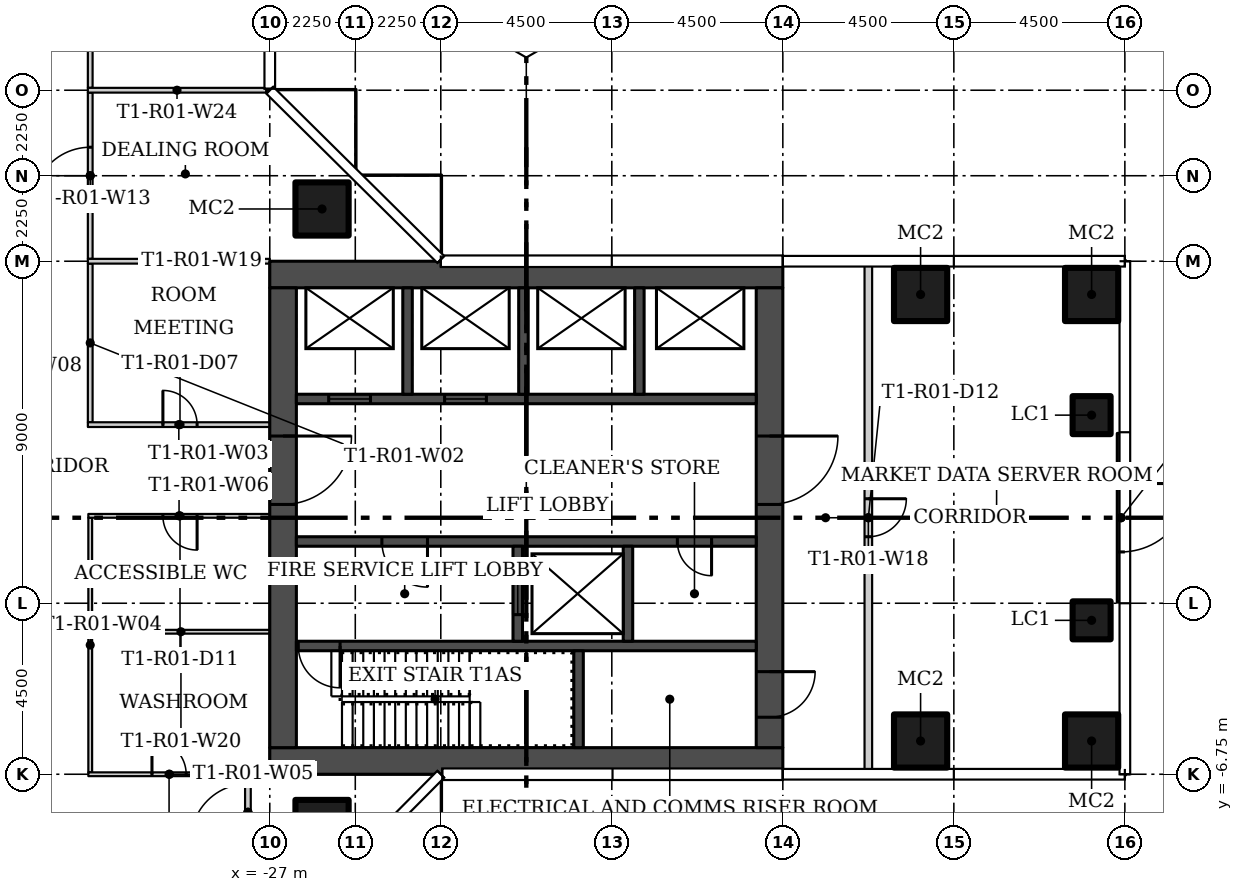
"""IFC4 building model, lengths in metres.
Left out: names, types, materials, properties, quantities, classifications, styles, units other than length and angle.
Written with IfcOpenShell. Run it as: python <this file> out.ifc"""

import sys

from ifc_helpers import new_model, si_unit, direction, frame, frame_2d, origin, origin_2d, place, context, subcontext, project, spatial, rectangle, hollow_rectangle, extrude, element, fill, save


model = new_model("IFC4")
c1 = context("Model", 3, precision=1e-05, world=origin(), true_north=direction((0.0, 1.0)))
c2 = subcontext(c1, "Body", "Model", "MODEL_VIEW")
j1 = project(units=[si_unit("LENGTHUNIT", "METRE"), si_unit("PLANEANGLEUNIT", "RADIAN")], contexts=[c1])
p1 = place(None, origin())
s1 = spatial("IfcSite", under=j1, at=p1, CompositionType="ELEMENT")
p2 = place(p1, origin())
s2 = spatial("IfcBuilding", under=s1, at=p2, CompositionType="ELEMENT")
p3 = place(p2, frame((0.0, 0.0, 28.5)))
s3 = spatial("IfcBuildingStorey", under=s2, at=p3, CompositionType="ELEMENT", Elevation=28.5)
for number, where in (
    (1, (-25.625, 8.125, 0.0)),
    (2, (-25.625, -8.125, 0.0)),
    (3, (-9.875, -5.875, 0.0)),
    (4, (-5.375, -5.875, 0.0)),
    (5, (-9.875, 5.875, 0.0)),
    (6, (-5.375, 5.875, 0.0)),
):
    element("IfcColumn", number, at=place(p3, frame(where)), inside=s3, PredefinedType="COLUMN", context=c2, shape_type="SweptSolid", body=[
        extrude(hollow_rectangle(XDim=1.4, YDim=1.4, WallThickness=0.05, at=origin_2d()), origin(), (0.0, 0.0, 1.0), 4.15),
    ])
for number, where in (
    (7, (-5.375, -2.7, 0.0)),
    (8, (-5.375, 2.7, 0.0)),
):
    element("IfcColumn", number, at=place(p3, frame(where)), inside=s3, PredefinedType="COLUMN", context=c2, shape_type="SweptSolid", body=[
        extrude(hollow_rectangle(XDim=1.0, YDim=1.0, WallThickness=0.04, at=origin_2d()), origin(), (0.0, 0.0, 1.0), 4.15),
    ])
p4 = place(p3, frame((-31.725, 20.175, 0.0), z_axis=(0.0, 0.0, 1.0), x_axis=(0.0, -1.0, 0.0)))
e9 = element("IfcWall", 9, at=p4, inside=s3, PredefinedType="PARTITIONING", context=c2, shape_type="SweptSolid", body=[
    extrude(rectangle(XDim=8.863, YDim=0.125, at=frame_2d((4.431, 0.0))), origin(), (0.0, 0.0, 1.0), 4.15),
])
p5 = place(p4, frame((3.675, 0.0, 0.0)))
e10 = element("IfcOpeningElement", 10, at=p5, cuts=e9, PredefinedType="OPENING", context=c2, shape_type="SweptSolid", body=[
    extrude(rectangle(XDim=1.5, YDim=2.1, at=frame_2d((0.75, 1.05))), frame((0.0, 0.073, 0.0), z_axis=(0.0, -1.0, 0.0), x_axis=(1.0, 0.0, 0.0)), (0.0, 0.0, 1.0), 0.145),
])
p6 = place(p3, frame((-31.725, 6.688, 0.0), z_axis=(0.0, 0.0, 1.0), x_axis=(0.0, -1.0, 0.0)))
e11 = element("IfcWall", 11, at=p6, inside=s3, PredefinedType="PARTITIONING", context=c2, shape_type="SweptSolid", body=[
    extrude(rectangle(XDim=4.175, YDim=0.125, at=frame_2d((2.087, 0.0))), origin(), (0.0, 0.0, 1.0), 4.15),
])
p7 = place(p3, frame((-31.787, 2.45, 0.0)))
e12 = element("IfcWall", 12, at=p7, inside=s3, PredefinedType="PARTITIONING", context=c2, shape_type="SweptSolid", body=[
    extrude(rectangle(XDim=4.787, YDim=0.125, at=frame_2d((2.394, 0.0))), origin(), (0.0, 0.0, 1.0), 4.15),
])
p8 = place(p7, frame((1.975, 0.0, 0.0)))
e13 = element("IfcOpeningElement", 13, at=p8, cuts=e12, PredefinedType="OPENING", context=c2, shape_type="SweptSolid", body=[
    extrude(rectangle(XDim=0.9, YDim=2.1, at=frame_2d((0.45, 1.05))), frame((0.0, 0.073, 0.0), z_axis=(0.0, -1.0, 0.0), x_axis=(1.0, 0.0, 0.0)), (0.0, 0.0, 1.0), 0.145),
])
p9 = place(p3, frame((-31.725, -0.0, 0.0), z_axis=(0.0, 0.0, 1.0), x_axis=(0.0, -1.0, 0.0)))
e14 = element("IfcWall", 14, at=p9, inside=s3, PredefinedType="PARTITIONING", context=c2, shape_type="SweptSolid", body=[
    extrude(rectangle(XDim=6.7, YDim=0.1, at=frame_2d((3.35, 0.0))), origin(), (0.0, 0.0, 1.0), 4.15),
])
p10 = place(p3, frame((-31.775, -6.75, 0.0)))
e15 = element("IfcWall", 15, at=p10, inside=s3, PredefinedType="PARTITIONING", context=c2, shape_type="SweptSolid", body=[
    extrude(rectangle(XDim=4.274, YDim=0.1, at=frame_2d((2.137, 0.0))), origin(), (0.0, 0.0, 1.0), 4.15),
])
p11 = place(p10, frame((1.675, 0.0, 0.0)))
e16 = element("IfcOpeningElement", 16, at=p11, cuts=e15, PredefinedType="OPENING", context=c2, shape_type="SweptSolid", body=[
    extrude(rectangle(XDim=0.9, YDim=2.1, at=frame_2d((0.45, 1.05))), frame((0.0, 0.06, 0.0), z_axis=(0.0, -1.0, 0.0), x_axis=(1.0, 0.0, 0.0)), (0.0, 0.0, 1.0), 0.12),
])
p12 = place(p3, frame((-27.0, 0.05, 0.0), z_axis=(0.0, 0.0, 1.0), x_axis=(-1.0, 0.0, 0.0)))
e17 = element("IfcWall", 17, at=p12, inside=s3, PredefinedType="PARTITIONING", context=c2, shape_type="SweptSolid", body=[
    extrude(rectangle(XDim=4.775, YDim=0.1, at=frame_2d((2.387, 0.0))), origin(), (0.0, 0.0, 1.0), 4.15),
])
p13 = place(p12, frame((1.912, 0.0, 0.0)))
e18 = element("IfcOpeningElement", 18, at=p13, cuts=e17, PredefinedType="OPENING", context=c2, shape_type="SweptSolid", body=[
    extrude(rectangle(XDim=0.9, YDim=2.1, at=frame_2d((0.45, 1.05))), frame((0.0, 0.06, 0.0), z_axis=(0.0, -1.0, 0.0), x_axis=(1.0, 0.0, 0.0)), (0.0, 0.0, 1.0), 0.12),
])
p14 = place(p3, frame((-31.725, 6.812, 0.0), z_axis=(0.0, 0.0, 1.0), x_axis=(0.0, 1.0, 0.0)))
e19 = element("IfcWall", 19, at=p14, inside=s3, PredefinedType="PARTITIONING", context=c2, shape_type="SweptSolid", body=[
    extrude(rectangle(XDim=4.375, YDim=0.125, at=frame_2d((2.188, 0.0))), origin(), (0.0, 0.0, 1.0), 4.15),
])
p15 = place(p14, frame((1.438, 0.0, 0.0)))
e20 = element("IfcOpeningElement", 20, at=p15, cuts=e19, PredefinedType="OPENING", context=c2, shape_type="SweptSolid", body=[
    extrude(rectangle(XDim=1.5, YDim=2.1, at=frame_2d((0.75, 1.05))), frame((0.0, 0.073, 0.0), z_axis=(0.0, -1.0, 0.0), x_axis=(1.0, 0.0, 0.0)), (0.0, 0.0, 1.0), 0.145),
])
p16 = place(p3, frame((-27.575, -8.675, 0.0), z_axis=(0.0, 0.0, 1.0), x_axis=(0.0, 1.0, 0.0)))
e21 = element("IfcWall", 21, at=p16, inside=s3, PredefinedType="PARTITIONING", context=c2, shape_type="SweptSolid", body=[
    extrude(rectangle(XDim=1.85, YDim=0.15, at=frame_2d((0.925, 0.0))), origin(), (0.0, 0.0, 1.0), 4.15),
])
p17 = place(p16, frame((0.175, 0.0, 0.0)))
e22 = element("IfcOpeningElement", 22, at=p17, cuts=e21, PredefinedType="OPENING", context=c2, shape_type="SweptSolid", body=[
    extrude(rectangle(XDim=1.5, YDim=2.4, at=frame_2d((0.75, 1.2))), frame((0.0, 0.085, 0.0), z_axis=(0.0, -1.0, 0.0), x_axis=(1.0, 0.0, 0.0)), (0.0, 0.0, 1.0), 0.17),
])
p18 = place(p3, frame((-11.25, 6.655, 0.0), z_axis=(0.0, 0.0, 1.0), x_axis=(0.0, -1.0, 0.0)))
e23 = element("IfcWall", 23, at=p18, inside=s3, PredefinedType="PARTITIONING", context=c2, shape_type="SweptSolid", body=[
    extrude(rectangle(XDim=13.31, YDim=0.2, at=frame_2d((6.655, 0.0))), origin(), (0.0, 0.0, 1.0), 4.15),
])
p19 = place(p18, frame((6.155, 0.0, 0.0)))
e24 = element("IfcOpeningElement", 24, at=p19, cuts=e23, PredefinedType="OPENING", context=c2, shape_type="SweptSolid", body=[
    extrude(rectangle(XDim=1.0, YDim=2.1, at=frame_2d((0.5, 1.05))), frame((0.0, 0.11, 0.0), z_axis=(0.0, -1.0, 0.0), x_axis=(1.0, 0.0, 0.0)), (0.0, 0.0, 1.0), 0.22),
])
p20 = place(p3, frame((-27.0, 6.75, 0.0), z_axis=(0.0, 0.0, 1.0), x_axis=(-1.0, 0.0, 0.0)))
e25 = element("IfcWall", 25, at=p20, inside=s3, PredefinedType="PARTITIONING", context=c2, shape_type="SweptSolid", body=[
    extrude(rectangle(XDim=4.787, YDim=0.125, at=frame_2d((2.394, 0.0))), origin(), (0.0, 0.0, 1.0), 4.15),
])
p21 = place(p3, frame((-27.0, -3.0, 0.0), z_axis=(0.0, 0.0, 1.0), x_axis=(-1.0, 0.0, 0.0)))
e26 = element("IfcWall", 26, at=p21, inside=s3, PredefinedType="PARTITIONING", context=c2, shape_type="SweptSolid", body=[
    extrude(rectangle(XDim=4.675, YDim=0.1, at=frame_2d((2.337, 0.0))), origin(), (0.0, 0.0, 1.0), 4.15),
])
p22 = place(p3, frame((-27.65, -6.75, 0.0)))
e27 = element("IfcWall", 27, at=p22, inside=s3, PredefinedType="PARTITIONING", context=c2, shape_type="SweptSolid", body=[
    extrude(rectangle(XDim=0.65, YDim=0.15, at=frame_2d((0.325, 0.0))), origin(), (0.0, 0.0, 1.0), 4.15),
])
p23 = place(p3, frame((-27.095, 11.25, 0.0), z_axis=(0.0, 0.0, 1.0), x_axis=(-1.0, 0.0, 0.0)))
e28 = element("IfcWall", 28, at=p23, inside=s3, PredefinedType="PARTITIONING", context=c2, shape_type="SweptSolid", body=[
    extrude(rectangle(XDim=4.692, YDim=0.125, at=frame_2d((2.346, 0.0))), origin(), (0.0, 0.0, 1.0), 4.15),
])
p24 = place(p3, frame((-4.6, 2.22, 0.0), z_axis=(0.0, 0.0, 1.0), x_axis=(0.0, -1.0, 0.0)))
e29 = element("IfcWall", 29, at=p24, inside=s3, PredefinedType="SOLIDWALL", context=c2, shape_type="SweptSolid", body=[
    extrude(rectangle(XDim=4.44, YDim=0.2, at=frame_2d((2.22, 0.0))), origin(), (0.0, 0.0, 1.0), 3.0),
])
p25 = place(p24, frame((1.32, 0.0, 0.0)))
e30 = element("IfcOpeningElement", 30, at=p25, cuts=e29, PredefinedType="OPENING", context=c2, shape_type="SweptSolid", body=[
    extrude(rectangle(XDim=1.8, YDim=2.4, at=frame_2d((0.9, 1.2))), frame((0.0, 0.11, 0.0), z_axis=(0.0, -1.0, 0.0), x_axis=(1.0, 0.0, 0.0)), (0.0, 0.0, 1.0), 0.22),
])
for number, where in (
    (31, (-27.0, -6.4, 0.0)),
    (32, (-27.0, 6.4, 0.0)),
):
    element("IfcWall", number, at=place(p3, frame(where)), inside=s3, PredefinedType="SHEAR", context=c2, shape_type="SweptSolid", body=[
        extrude(rectangle(XDim=13.5, YDim=0.7, at=frame_2d((6.75, 0.0))), origin(), (0.0, 0.0, 1.0), 4.15),
    ])
p26 = place(p3, frame((-26.65, 6.05, 0.0), z_axis=(0.0, 0.0, 1.0), x_axis=(0.0, -1.0, 0.0)))
e33 = element("IfcWall", 33, at=p26, inside=s3, PredefinedType="SHEAR", context=c2, shape_type="SweptSolid", body=[
    extrude(rectangle(XDim=12.1, YDim=0.7, at=frame_2d((6.05, 0.0))), origin(), (0.0, 0.0, 1.0), 4.15),
])
p27 = place(p26, frame((3.9, 0.0, 0.0)))
e34 = element("IfcOpeningElement", 34, at=p27, cuts=e33, PredefinedType="OPENING", context=c2, shape_type="SweptSolid", body=[
    extrude(rectangle(XDim=1.8, YDim=2.4, at=frame_2d((0.9, 1.2))), frame((0.0, 0.36, 0.0), z_axis=(0.0, -1.0, 0.0), x_axis=(1.0, 0.0, 0.0)), (0.0, 0.0, 1.0), 0.72),
])
p28 = place(p3, frame((-13.85, 6.05, 0.0), z_axis=(0.0, 0.0, 1.0), x_axis=(0.0, -1.0, 0.0)))
e35 = element("IfcWall", 35, at=p28, inside=s3, PredefinedType="SHEAR", context=c2, shape_type="SweptSolid", body=[
    extrude(rectangle(XDim=12.1, YDim=0.7, at=frame_2d((6.05, 0.0))), origin(), (0.0, 0.0, 1.0), 4.15),
])
p29 = place(p28, frame((10.1, 0.0, 0.0)))
e36 = element("IfcOpeningElement", 36, at=p29, cuts=e35, PredefinedType="OPENING", context=c2, shape_type="SweptSolid", body=[
    extrude(rectangle(XDim=1.2, YDim=2.1, at=frame_2d((0.6, 1.05))), frame((0.0, 0.36, 0.0), z_axis=(0.0, -1.0, 0.0), x_axis=(1.0, 0.0, 0.0)), (0.0, 0.0, 1.0), 0.72),
])
p30 = place(p28, frame((3.9, 0.0, 0.0)))
e37 = element("IfcOpeningElement", 37, at=p30, cuts=e35, PredefinedType="OPENING", context=c2, shape_type="SweptSolid", body=[
    extrude(rectangle(XDim=1.8, YDim=2.4, at=frame_2d((0.9, 1.2))), frame((0.0, 0.36, 0.0), z_axis=(0.0, -1.0, 0.0), x_axis=(1.0, 0.0, 0.0)), (0.0, 0.0, 1.0), 0.72),
])
p31 = place(p3, frame((-14.2, -3.375, 0.0), z_axis=(0.0, 0.0, 1.0), x_axis=(-1.0, 0.0, 0.0)))
e38 = element("IfcWall", 38, at=p31, inside=s3, PredefinedType="SHEAR", context=c2, shape_type="SweptSolid", body=[
    extrude(rectangle(XDim=12.1, YDim=0.25, at=frame_2d((6.05, 0.0))), origin(), (0.0, 0.0, 1.0), 4.15),
])
p32 = place(p31, frame((10.95, 0.0, 0.0)))
e39 = element("IfcOpeningElement", 39, at=p32, cuts=e38, PredefinedType="OPENING", context=c2, shape_type="SweptSolid", body=[
    extrude(rectangle(XDim=1.1, YDim=2.1, at=frame_2d((0.55, 1.05))), frame((0.0, 0.135, 0.0), z_axis=(0.0, -1.0, 0.0), x_axis=(1.0, 0.0, 0.0)), (0.0, 0.0, 1.0), 0.27),
])
p33 = place(p3, frame((-18.875, -6.05, 0.0), z_axis=(0.0, 0.0, 1.0), x_axis=(0.0, 1.0, 0.0)))
e40 = element("IfcWall", 40, at=p33, inside=s3, PredefinedType="SHEAR", context=c2, shape_type="SweptSolid", body=[
    extrude(rectangle(XDim=2.55, YDim=0.25, at=frame_2d((1.275, 0.0))), origin(), (0.0, 0.0, 1.0), 4.15),
])
p34 = place(p3, frame((-14.2, -0.625, 0.0), z_axis=(0.0, 0.0, 1.0), x_axis=(-1.0, 0.0, 0.0)))
e41 = element("IfcWall", 41, at=p34, inside=s3, PredefinedType="SHEAR", context=c2, shape_type="SweptSolid", body=[
    extrude(rectangle(XDim=12.1, YDim=0.25, at=frame_2d((6.05, 0.0))), origin(), (0.0, 0.0, 1.0), 4.15),
])
p35 = place(p34, frame((8.65, 0.0, 0.0)))
e42 = element("IfcOpeningElement", 42, at=p35, cuts=e41, PredefinedType="OPENING", context=c2, shape_type="SweptSolid", body=[
    extrude(rectangle(XDim=1.2, YDim=2.1, at=frame_2d((0.6, 1.05))), frame((0.0, 0.135, 0.0), z_axis=(0.0, -1.0, 0.0), x_axis=(1.0, 0.0, 0.0)), (0.0, 0.0, 1.0), 0.27),
])
p36 = place(p34, frame((1.175, 0.0, 0.0)))
e43 = element("IfcOpeningElement", 43, at=p36, cuts=e41, PredefinedType="OPENING", context=c2, shape_type="SweptSolid", body=[
    extrude(rectangle(XDim=0.9, YDim=2.1, at=frame_2d((0.45, 1.05))), frame((0.0, 0.135, 0.0), z_axis=(0.0, -1.0, 0.0), x_axis=(1.0, 0.0, 0.0)), (0.0, 0.0, 1.0), 0.27),
])
p37 = place(p3, frame((-20.475, -3.25, 0.0), z_axis=(0.0, 0.0, 1.0), x_axis=(0.0, 1.0, 0.0)))
e44 = element("IfcWall", 44, at=p37, inside=s3, PredefinedType="SHEAR", context=c2, shape_type="SweptSolid", body=[
    extrude(rectangle(XDim=2.5, YDim=0.25, at=frame_2d((1.25, 0.0))), origin(), (0.0, 0.0, 1.0), 4.15),
])
p38 = place(p37, frame((0.7, 0.0, 0.0)))
e45 = element("IfcOpeningElement", 45, at=p38, cuts=e44, PredefinedType="OPENING", context=c2, shape_type="SweptSolid", body=[
    extrude(rectangle(XDim=1.1, YDim=2.1, at=frame_2d((0.55, 1.05))), frame((0.0, 0.135, 0.0), z_axis=(0.0, -1.0, 0.0), x_axis=(1.0, 0.0, 0.0)), (0.0, 0.0, 1.0), 0.27),
])
p39 = place(p3, frame((-17.575, -3.25, 0.0), z_axis=(0.0, 0.0, 1.0), x_axis=(0.0, 1.0, 0.0)))
e46 = element("IfcWall", 46, at=p39, inside=s3, PredefinedType="SHEAR", context=c2, shape_type="SweptSolid", body=[
    extrude(rectangle(XDim=2.5, YDim=0.25, at=frame_2d((1.25, 0.0))), origin(), (0.0, 0.0, 1.0), 4.15),
])
p40 = place(p3, frame((-26.3, 3.125, 0.0)))
e47 = element("IfcWall", 47, at=p40, inside=s3, PredefinedType="SHEAR", context=c2, shape_type="SweptSolid", body=[
    extrude(rectangle(XDim=12.1, YDim=0.25, at=frame_2d((6.05, 0.0))), origin(), (0.0, 0.0, 1.0), 4.15),
])
p41 = place(p40, frame((0.85, 0.0, 0.0)))
e48 = element("IfcOpeningElement", 48, at=p41, cuts=e47, PredefinedType="OPENING", context=c2, shape_type="SweptSolid", body=[
    extrude(rectangle(XDim=1.1, YDim=2.1, at=frame_2d((0.55, 1.05))), frame((0.0, 0.135, 0.0), z_axis=(0.0, -1.0, 0.0), x_axis=(1.0, 0.0, 0.0)), (0.0, 0.0, 1.0), 0.27),
])
p42 = place(p40, frame((3.9, 0.0, 0.0)))
e49 = element("IfcOpeningElement", 49, at=p42, cuts=e47, PredefinedType="OPENING", context=c2, shape_type="SweptSolid", body=[
    extrude(rectangle(XDim=1.1, YDim=2.1, at=frame_2d((0.55, 1.05))), frame((0.0, 0.135, 0.0), z_axis=(0.0, -1.0, 0.0), x_axis=(1.0, 0.0, 0.0)), (0.0, 0.0, 1.0), 0.27),
])
for number, where, z_axis, x_axis in (
    (50, (-23.375, 3.25, 0.0), (0.0, 0.0, 1.0), (0.0, 1.0, 0.0)),
    (51, (-20.325, 3.25, 0.0), (0.0, 0.0, 1.0), (0.0, 1.0, 0.0)),
    (52, (-17.275, 3.25, 0.0), (0.0, 0.0, 1.0), (0.0, 1.0, 0.0)),
):
    element("IfcWall", number, at=place(p3, frame(where, z_axis=z_axis, x_axis=x_axis)), inside=s3, PredefinedType="SHEAR", context=c2, shape_type="SweptSolid", body=[
        extrude(rectangle(XDim=2.8, YDim=0.25, at=frame_2d((1.4, 0.0))), origin(), (0.0, 0.0, 1.0), 4.15),
    ])
p43 = place(p11, origin())
e53 = element("IfcDoor", 53, at=p43, inside=s3, OperationType="SINGLE_SWING_RIGHT", PredefinedType="DOOR", context=c2, shape_type="SweptSolid", body=[
    extrude(rectangle(XDim=0.9, YDim=2.1, at=frame_2d((0.45, 1.05))), frame((0.0, 0.025, 0.0), z_axis=(0.0, -1.0, 0.0), x_axis=(1.0, 0.0, 0.0)), (0.0, 0.0, 1.0), 0.05),
])
fill(e16, e53)
p44 = place(p8, origin())
e54 = element("IfcDoor", 54, at=p44, inside=s3, OperationType="SINGLE_SWING_LEFT", PredefinedType="DOOR", context=c2, shape_type="SweptSolid", body=[
    extrude(rectangle(XDim=0.9, YDim=2.1, at=frame_2d((0.45, 1.05))), frame((0.0, 0.025, 0.0), z_axis=(0.0, -1.0, 0.0), x_axis=(1.0, 0.0, 0.0)), (0.0, 0.0, 1.0), 0.05),
])
fill(e13, e54)
p45 = place(p15, origin())
e55 = element("IfcDoor", 55, at=p45, inside=s3, OperationType="DOUBLE_DOOR_SINGLE_SWING", PredefinedType="DOOR", context=c2, shape_type="SweptSolid", body=[
    extrude(rectangle(XDim=1.5, YDim=2.1, at=frame_2d((0.75, 1.05))), frame((0.0, 0.025, 0.0), z_axis=(0.0, -1.0, 0.0), x_axis=(1.0, 0.0, 0.0)), (0.0, 0.0, 1.0), 0.05),
])
fill(e20, e55)
p46 = place(p17, origin())
e56 = element("IfcDoor", 56, at=p46, inside=s3, OperationType="DOUBLE_DOOR_SINGLE_SWING", PredefinedType="DOOR", context=c2, shape_type="SweptSolid", body=[
    extrude(rectangle(XDim=1.5, YDim=2.4, at=frame_2d((0.75, 1.2))), frame((0.0, 0.025, 0.0), z_axis=(0.0, -1.0, 0.0), x_axis=(1.0, 0.0, 0.0)), (0.0, 0.0, 1.0), 0.05),
])
fill(e22, e56)
p47 = place(p13, origin())
e57 = element("IfcDoor", 57, at=p47, inside=s3, OperationType="SINGLE_SWING_LEFT", PredefinedType="DOOR", context=c2, shape_type="SweptSolid", body=[
    extrude(rectangle(XDim=0.9, YDim=2.1, at=frame_2d((0.45, 1.05))), frame((0.0, 0.025, 0.0), z_axis=(0.0, -1.0, 0.0), x_axis=(1.0, 0.0, 0.0)), (0.0, 0.0, 1.0), 0.05),
])
fill(e18, e57)
p48 = place(p19, origin())
e58 = element("IfcDoor", 58, at=p48, inside=s3, OperationType="SINGLE_SWING_RIGHT", PredefinedType="DOOR", context=c2, shape_type="SweptSolid", body=[
    extrude(rectangle(XDim=1.0, YDim=2.1, at=frame_2d((0.5, 1.05))), frame((0.0, 0.025, 0.0), z_axis=(0.0, -1.0, 0.0), x_axis=(1.0, 0.0, 0.0)), (0.0, 0.0, 1.0), 0.05),
])
fill(e24, e58)
p49 = place(p25, origin())
e59 = element("IfcDoor", 59, at=p49, inside=s3, OperationType="DOUBLE_DOOR_SINGLE_SWING", PredefinedType="DOOR", context=c2, shape_type="SweptSolid", body=[
    extrude(rectangle(XDim=1.8, YDim=2.4, at=frame_2d((0.9, 1.2))), frame((0.0, 0.025, 0.0), z_axis=(0.0, -1.0, 0.0), x_axis=(1.0, 0.0, 0.0)), (0.0, 0.0, 1.0), 0.05),
])
fill(e30, e59)
p50 = place(p27, origin())
e60 = element("IfcDoor", 60, at=p50, inside=s3, OperationType="DOUBLE_DOOR_SINGLE_SWING", PredefinedType="DOOR", context=c2, shape_type="SweptSolid", body=[
    extrude(rectangle(XDim=1.8, YDim=2.4, at=frame_2d((0.9, 1.2))), frame((0.0, 0.025, 0.0), z_axis=(0.0, -1.0, 0.0), x_axis=(1.0, 0.0, 0.0)), (0.0, 0.0, 1.0), 0.05),
])
fill(e34, e60)
p51 = place(p29, origin())
e61 = element("IfcDoor", 61, at=p51, inside=s3, OperationType="SINGLE_SWING_RIGHT", PredefinedType="DOOR", context=c2, shape_type="SweptSolid", body=[
    extrude(rectangle(XDim=1.2, YDim=2.1, at=frame_2d((0.6, 1.05))), frame((0.0, 0.025, 0.0), z_axis=(0.0, -1.0, 0.0), x_axis=(1.0, 0.0, 0.0)), (0.0, 0.0, 1.0), 0.05),
])
fill(e36, e61)
p52 = place(p30, origin())
e62 = element("IfcDoor", 62, at=p52, inside=s3, OperationType="DOUBLE_DOOR_SINGLE_SWING", PredefinedType="DOOR", context=c2, shape_type="SweptSolid", body=[
    extrude(rectangle(XDim=1.8, YDim=2.4, at=frame_2d((0.9, 1.2))), frame((0.0, 0.025, 0.0), z_axis=(0.0, -1.0, 0.0), x_axis=(1.0, 0.0, 0.0)), (0.0, 0.0, 1.0), 0.05),
])
fill(e37, e62)
p53 = place(p32, origin())
e63 = element("IfcDoor", 63, at=p53, inside=s3, OperationType="SINGLE_SWING_RIGHT", PredefinedType="DOOR", context=c2, shape_type="SweptSolid", body=[
    extrude(rectangle(XDim=1.1, YDim=2.1, at=frame_2d((0.55, 1.05))), frame((0.0, 0.025, 0.0), z_axis=(0.0, -1.0, 0.0), x_axis=(1.0, 0.0, 0.0)), (0.0, 0.0, 1.0), 0.05),
])
fill(e39, e63)
p54 = place(p35, origin())
e64 = element("IfcDoor", 64, at=p54, inside=s3, OperationType="SINGLE_SWING_RIGHT", PredefinedType="DOOR", context=c2, shape_type="SweptSolid", body=[
    extrude(rectangle(XDim=1.2, YDim=2.1, at=frame_2d((0.6, 1.05))), frame((0.0, 0.025, 0.0), z_axis=(0.0, -1.0, 0.0), x_axis=(1.0, 0.0, 0.0)), (0.0, 0.0, 1.0), 0.05),
])
fill(e42, e64)
p55 = place(p36, origin())
e65 = element("IfcDoor", 65, at=p55, inside=s3, OperationType="SINGLE_SWING_LEFT", PredefinedType="DOOR", context=c2, shape_type="SweptSolid", body=[
    extrude(rectangle(XDim=0.9, YDim=2.1, at=frame_2d((0.45, 1.05))), frame((0.0, 0.025, 0.0), z_axis=(0.0, -1.0, 0.0), x_axis=(1.0, 0.0, 0.0)), (0.0, 0.0, 1.0), 0.05),
])
fill(e43, e65)
p56 = place(p38, origin())
e66 = element("IfcDoor", 66, at=p56, inside=s3, OperationType="SLIDING_TO_LEFT", PredefinedType="DOOR", context=c2, shape_type="SweptSolid", body=[
    extrude(rectangle(XDim=1.1, YDim=2.1, at=frame_2d((0.55, 1.05))), frame((0.0, 0.025, 0.0), z_axis=(0.0, -1.0, 0.0), x_axis=(1.0, 0.0, 0.0)), (0.0, 0.0, 1.0), 0.05),
])
fill(e45, e66)
p57 = place(p41, origin())
e67 = element("IfcDoor", 67, at=p57, inside=s3, OperationType="SLIDING_TO_LEFT", PredefinedType="DOOR", context=c2, shape_type="SweptSolid", body=[
    extrude(rectangle(XDim=1.1, YDim=2.1, at=frame_2d((0.55, 1.05))), frame((0.0, 0.025, 0.0), z_axis=(0.0, -1.0, 0.0), x_axis=(1.0, 0.0, 0.0)), (0.0, 0.0, 1.0), 0.05),
])
fill(e48, e67)
p58 = place(p42, origin())
e68 = element("IfcDoor", 68, at=p58, inside=s3, OperationType="SLIDING_TO_LEFT", PredefinedType="DOOR", context=c2, shape_type="SweptSolid", body=[
    extrude(rectangle(XDim=1.1, YDim=2.1, at=frame_2d((0.55, 1.05))), frame((0.0, 0.025, 0.0), z_axis=(0.0, -1.0, 0.0), x_axis=(1.0, 0.0, 0.0)), (0.0, 0.0, 1.0), 0.05),
])
fill(e49, e68)
save(model, sys.argv[1])
